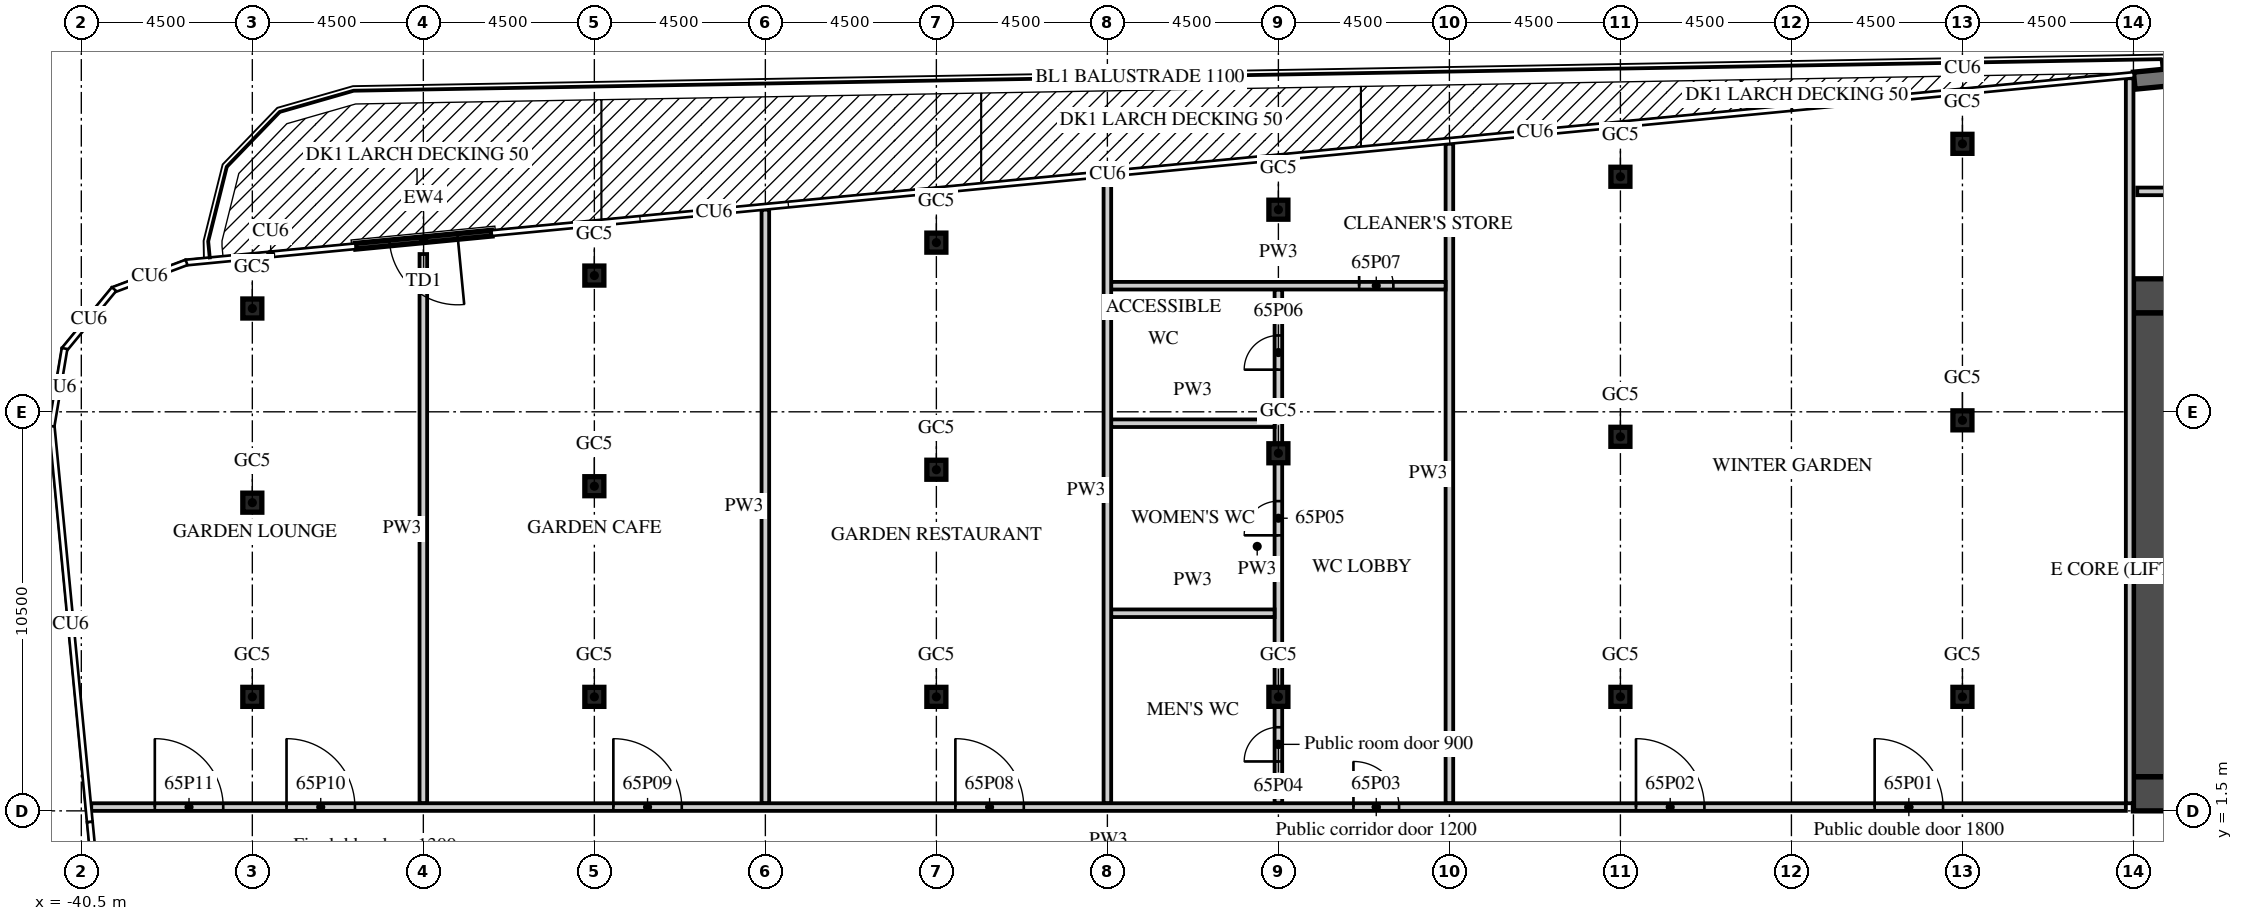
"""IFC4 building model, lengths in metres.
Left out: names, types, materials, properties, quantities, classifications, styles, units other than length and angle.
Written with IfcOpenShell. Run it as: python <this file> out.ifc"""

import sys

from ifc_helpers import new_model, si_unit, direction, frame, frame_2d, origin, origin_2d, place, context, subcontext, project, spatial, rectangle, extrude, element, fill, save


model = new_model("IFC4")
c1 = context("Model", 3, precision=1e-05, world=origin(), true_north=direction((0.0, 1.0)))
c2 = subcontext(c1, "Body", "Model", "MODEL_VIEW")
j1 = project(units=[si_unit("LENGTHUNIT", "METRE"), si_unit("PLANEANGLEUNIT", "RADIAN")], contexts=[c1])
p1 = place(None, origin())
s1 = spatial("IfcSite", under=j1, at=p1, CompositionType="ELEMENT")
p2 = place(p1, origin())
s2 = spatial("IfcBuilding", under=s1, at=p2, CompositionType="ELEMENT")
p3 = place(p2, frame((0.0, 0.0, 261.9)))
s3 = spatial("IfcBuildingStorey", under=s2, at=p3, CompositionType="ELEMENT", Elevation=261.9)
for number, where, z_axis, x_axis in (
    (1, (-36.0, 4.5, 0.0), (0.0, 0.0, 1.0), (1.0, 0.0, 0.0)),
    (2, (-36.0, 9.609, 0.0), (0.0, 0.0, 1.0), (1.0, 0.0, 0.0)),
    (3, (-36.0, 14.719, 0.0), (0.0, 0.0, 1.0), (1.0, 0.0, 0.0)),
    (4, (-27.0, 4.5, 0.0), (0.0, 0.0, 1.0), (1.0, 0.0, 0.0)),
    (5, (-27.0, 10.042, 0.0), (0.0, 0.0, 1.0), (1.0, 0.0, 0.0)),
    (6, (-27.0, 15.585, 0.0), (0.0, 0.0, 1.0), (1.0, 0.0, 0.0)),
    (7, (-18.0, 4.5, 0.0), (0.0, 0.0, 1.0), (1.0, 0.0, 0.0)),
    (8, (-18.0, 10.476, 0.0), (0.0, 0.0, 1.0), (1.0, 0.0, 0.0)),
    (9, (-18.0, 16.452, 0.0), (0.0, 0.0, 1.0), (1.0, 0.0, 0.0)),
    (10, (-9.0, 4.5, 0.0), (0.0, 0.0, 1.0), (1.0, 0.0, 0.0)),
    (11, (-9.0, 10.909, 0.0), (0.0, 0.0, 1.0), (1.0, 0.0, 0.0)),
    (12, (-9.0, 17.318, 0.0), (0.0, 0.0, 1.0), (1.0, 0.0, 0.0)),
    (13, (0.0, 4.5, 0.0), (0.0, 0.0, 1.0), (1.0, 0.0, 0.0)),
    (14, (0.0, 11.342, 0.0), (0.0, 0.0, 1.0), (1.0, 0.0, 0.0)),
    (15, (0.0, 18.185, 0.0), (0.0, 0.0, 1.0), (1.0, 0.0, 0.0)),
    (16, (9.0, 4.5, 0.0), (0.0, 0.0, 1.0), (1.0, 0.0, 0.0)),
    (17, (9.0, 11.776, 0.0), (0.0, 0.0, 1.0), (1.0, 0.0, 0.0)),
    (18, (9.0, 19.052, 0.0), (0.0, 0.0, 1.0), (1.0, 0.0, 0.0)),
):
    element("IfcColumn", number, at=place(p3, frame(where, z_axis=z_axis, x_axis=x_axis)), inside=s3, PredefinedType="COLUMN", context=c2, shape_type="SweptSolid", body=[
        extrude(rectangle(XDim=0.5, YDim=0.5, at=origin_2d()), origin(), (0.0, 0.0, 1.0), 5.32),
    ])
p4 = place(p3, frame((30.946, 22.391, 0.0), z_axis=(0.0, 0.0, 1.0), x_axis=(-0.995396397117, -0.095843688398, 0.0)))
e19 = element("IfcWall", 19, at=p4, inside=s3, PredefinedType="SOLIDWALL", context=c2, shape_type="SweptSolid", body=[
    extrude(rectangle(XDim=17.505, YDim=0.45, at=frame_2d((8.752, 0.0))), origin(), (0.0, 0.0, 1.0), 6.32),
])
p5 = place(p3, frame((-29.701, 16.702, 0.0), z_axis=(0.0, 0.0, 1.0), x_axis=(-0.995398337395, -0.095823535273, 0.0)))
e20 = element("IfcWall", 20, at=p5, inside=s3, PredefinedType="SOLIDWALL", context=c2, shape_type="SweptSolid", body=[
    extrude(rectangle(XDim=3.6, YDim=0.15, at=frame_2d((1.8, 0.0))), origin(), (0.0, 0.0, 1.0), 6.32),
])
p6 = place(p5, frame((0.9, 0.0, 0.0)))
e21 = element("IfcOpeningElement", 21, at=p6, cuts=e20, PredefinedType="OPENING", context=c2, shape_type="SweptSolid", body=[
    extrude(rectangle(XDim=1.8, YDim=2.4, at=frame_2d((0.9, 1.2))), frame((0.0, 0.085, 0.0), z_axis=(0.0, -1.0, 0.0), x_axis=(1.0, 0.0, 0.0)), (0.0, 0.0, 1.0), 0.17),
])
p7 = place(p3, frame((13.5, 1.95, 0.0), z_axis=(0.0, 0.0, 1.0), x_axis=(1.0, 0.0, 0.0)))
e22 = element("IfcWall", 22, at=p7, inside=s3, PredefinedType="SHEAR", context=c2, shape_type="SweptSolid", body=[
    extrude(rectangle(XDim=18.0, YDim=0.9, at=frame_2d((9.0, 0.0))), origin(), (0.0, 0.0, 1.0), 6.32),
])
p8 = place(p7, frame((1.475, 0.0, 0.0)))
e23 = element("IfcOpeningElement", 23, at=p8, cuts=e22, PredefinedType="OPENING", context=c2, shape_type="SweptSolid", body=[
    extrude(rectangle(XDim=1.8, YDim=2.1, at=frame_2d((0.9, 1.05))), frame((0.0, 0.46, 0.0), z_axis=(0.0, -1.0, 0.0), x_axis=(1.0, 0.0, 0.0)), (0.0, 0.0, 1.0), 0.92),
])
p9 = place(p3, frame((13.5, 15.05, 0.0), z_axis=(0.0, 0.0, 1.0), x_axis=(1.0, 0.0, 0.0)))
e24 = element("IfcWall", 24, at=p9, inside=s3, PredefinedType="SHEAR", context=c2, shape_type="SweptSolid", body=[
    extrude(rectangle(XDim=6.8, YDim=0.9, at=frame_2d((3.4, 0.0))), origin(), (0.0, 0.0, 1.0), 6.32),
])
p10 = place(p9, frame((4.725, 0.0, 0.0)))
e25 = element("IfcOpeningElement", 25, at=p10, cuts=e24, PredefinedType="OPENING", context=c2, shape_type="SweptSolid", body=[
    extrude(rectangle(XDim=1.2, YDim=2.1, at=frame_2d((0.6, 1.05))), frame((0.0, 0.46, 0.0), z_axis=(0.0, -1.0, 0.0), x_axis=(1.0, 0.0, 0.0)), (0.0, 0.0, 1.0), 0.92),
])
p11 = place(p3, frame((13.95, 2.4, 0.0), z_axis=(0.0, 0.0, 1.0), x_axis=(0.0, 1.0, 0.0)))
e26 = element("IfcWall", 26, at=p11, inside=s3, PredefinedType="SHEAR", context=c2, shape_type="SweptSolid", body=[
    extrude(rectangle(XDim=12.2, YDim=0.9, at=frame_2d((6.1, 0.0))), origin(), (0.0, 0.0, 1.0), 6.32),
])
p12 = place(p3, frame((13.6, 17.8, 0.0), z_axis=(0.0, 0.0, 1.0), x_axis=(1.0, 0.0, 0.0)))
e27 = element("IfcWall", 27, at=p12, inside=s3, PredefinedType="PARTITIONING", context=c2, shape_type="SweptSolid", body=[
    extrude(rectangle(XDim=21.656, YDim=0.2, at=frame_2d((10.828, 0.0))), origin(), (0.0, 0.0, 1.0), 6.32),
])
p13 = place(p12, frame((17.812, 0.0, 0.0)))
e28 = element("IfcOpeningElement", 28, at=p13, cuts=e27, PredefinedType="OPENING", context=c2, shape_type="SweptSolid", body=[
    extrude(rectangle(XDim=0.9, YDim=2.1, at=frame_2d((0.45, 1.05))), frame((0.0, 0.11, 0.0), z_axis=(0.0, -1.0, 0.0), x_axis=(1.0, 0.0, 0.0)), (0.0, 0.0, 1.0), 0.22),
])
p14 = place(p12, frame((9.512, 0.0, 0.0)))
e29 = element("IfcOpeningElement", 29, at=p14, cuts=e27, PredefinedType="OPENING", context=c2, shape_type="SweptSolid", body=[
    extrude(rectangle(XDim=0.9, YDim=2.1, at=frame_2d((0.45, 1.05))), frame((0.0, 0.11, 0.0), z_axis=(0.0, -1.0, 0.0), x_axis=(1.0, 0.0, 0.0)), (0.0, 0.0, 1.0), 0.22),
])
p15 = place(p3, frame((-4.5, 1.7, 0.0), z_axis=(0.0, 0.0, 1.0), x_axis=(0.0, 1.0, 0.0)))
e30 = element("IfcWall", 30, at=p15, inside=s3, PredefinedType="PARTITIONING", context=c2, shape_type="SweptSolid", body=[
    extrude(rectangle(XDim=17.353, YDim=0.2, at=frame_2d((8.677, 0.0))), origin(), (0.0, 0.0, 1.0), 6.32),
])
p16 = place(p3, frame((-9.0, 1.7, 0.0), z_axis=(0.0, 0.0, 1.0), x_axis=(0.0, 1.0, 0.0)))
e31 = element("IfcWall", 31, at=p16, inside=s3, PredefinedType="PARTITIONING", context=c2, shape_type="SweptSolid", body=[
    extrude(rectangle(XDim=13.518, YDim=0.2, at=frame_2d((6.759, 0.0))), origin(), (0.0, 0.0, 1.0), 5.32),
])
p17 = place(p16, frame((1.1, 0.0, 0.0)))
e32 = element("IfcOpeningElement", 32, at=p17, cuts=e31, PredefinedType="OPENING", context=c2, shape_type="SweptSolid", body=[
    extrude(rectangle(XDim=0.9, YDim=2.1, at=frame_2d((0.45, 1.05))), frame((0.0, 0.11, 0.0), z_axis=(0.0, -1.0, 0.0), x_axis=(1.0, 0.0, 0.0)), (0.0, 0.0, 1.0), 0.22),
])
p18 = place(p16, frame((7.05, 0.0, 0.0)))
e33 = element("IfcOpeningElement", 33, at=p18, cuts=e31, PredefinedType="OPENING", context=c2, shape_type="SweptSolid", body=[
    extrude(rectangle(XDim=0.9, YDim=2.1, at=frame_2d((0.45, 1.05))), frame((0.0, 0.11, 0.0), z_axis=(0.0, -1.0, 0.0), x_axis=(1.0, 0.0, 0.0)), (0.0, 0.0, 1.0), 0.22),
])
p19 = place(p16, frame((11.409, 0.0, 0.0)))
e34 = element("IfcOpeningElement", 34, at=p19, cuts=e31, PredefinedType="OPENING", context=c2, shape_type="SweptSolid", body=[
    extrude(rectangle(XDim=0.9, YDim=2.1, at=frame_2d((0.45, 1.05))), frame((0.0, 0.11, 0.0), z_axis=(0.0, -1.0, 0.0), x_axis=(1.0, 0.0, 0.0)), (0.0, 0.0, 1.0), 0.22),
])
for number, where, z_axis, x_axis in (
    (35, (-13.4, 6.7, 0.0), (0.0, 0.0, 1.0), (1.0, 0.0, 0.0)),
    (36, (-13.4, 11.7, 0.0), (0.0, 0.0, 1.0), (1.0, 0.0, 0.0)),
):
    element("IfcWall", number, at=place(p3, frame(where, z_axis=z_axis, x_axis=x_axis)), inside=s3, PredefinedType="PARTITIONING", context=c2, shape_type="SweptSolid", body=[
        extrude(rectangle(XDim=4.3, YDim=0.2, at=frame_2d((2.15, 0.0))), origin(), (0.0, 0.0, 1.0), 5.32),
    ])
p20 = place(p3, frame((-13.4, 15.318, 0.0), z_axis=(0.0, 0.0, 1.0), x_axis=(1.0, 0.0, 0.0)))
e37 = element("IfcWall", 37, at=p20, inside=s3, PredefinedType="PARTITIONING", context=c2, shape_type="SweptSolid", body=[
    extrude(rectangle(XDim=8.8, YDim=0.2, at=frame_2d((4.4, 0.0))), origin(), (0.0, 0.0, 1.0), 5.32),
])
p21 = place(p20, frame((6.525, 0.0, 0.0)))
e38 = element("IfcOpeningElement", 38, at=p21, cuts=e37, PredefinedType="OPENING", context=c2, shape_type="SweptSolid", body=[
    extrude(rectangle(XDim=0.9, YDim=2.1, at=frame_2d((0.45, 1.05))), frame((0.0, 0.11, 0.0), z_axis=(0.0, -1.0, 0.0), x_axis=(1.0, 0.0, 0.0)), (0.0, 0.0, 1.0), 0.22),
])
p22 = place(p3, frame((-13.5, 1.7, 0.0), z_axis=(0.0, 0.0, 1.0), x_axis=(0.0, 1.0, 0.0)))
e39 = element("IfcWall", 39, at=p22, inside=s3, PredefinedType="PARTITIONING", context=c2, shape_type="SweptSolid", body=[
    extrude(rectangle(XDim=16.486, YDim=0.2, at=frame_2d((8.243, 0.0))), origin(), (0.0, 0.0, 1.0), 6.32),
])
p23 = place(p3, frame((-22.5, 1.7, 0.0), z_axis=(0.0, 0.0, 1.0), x_axis=(0.0, 1.0, 0.0)))
e40 = element("IfcWall", 40, at=p23, inside=s3, PredefinedType="PARTITIONING", context=c2, shape_type="SweptSolid", body=[
    extrude(rectangle(XDim=15.62, YDim=0.2, at=frame_2d((7.81, 0.0))), origin(), (0.0, 0.0, 1.0), 6.32),
])
p24 = place(p3, frame((-31.5, 1.7, 0.0), z_axis=(0.0, 0.0, 1.0), x_axis=(0.0, 1.0, 0.0)))
e41 = element("IfcWall", 41, at=p24, inside=s3, PredefinedType="PARTITIONING", context=c2, shape_type="SweptSolid", body=[
    extrude(rectangle(XDim=14.452, YDim=0.2, at=frame_2d((7.226, 0.0))), origin(), (0.0, 0.0, 1.0), 6.32),
])
p25 = place(p3, frame((-40.239, 1.6, 0.0), z_axis=(0.0, 0.0, 1.0), x_axis=(1.0, 0.0, 0.0)))
e42 = element("IfcWall", 42, at=p25, inside=s3, PredefinedType="PARTITIONING", context=c2, shape_type="SweptSolid", body=[
    extrude(rectangle(XDim=53.539, YDim=0.2, at=frame_2d((26.77, 0.0))), origin(), (0.0, 0.0, 1.0), 5.32),
])
p26 = place(p25, frame((46.929, 0.0, 0.0)))
e43 = element("IfcOpeningElement", 43, at=p26, cuts=e42, PredefinedType="OPENING", context=c2, shape_type="SweptSolid", body=[
    extrude(rectangle(XDim=1.8, YDim=2.1, at=frame_2d((0.9, 1.05))), frame((0.0, 0.11, 0.0), z_axis=(0.0, -1.0, 0.0), x_axis=(1.0, 0.0, 0.0)), (0.0, 0.0, 1.0), 0.22),
])
p27 = place(p25, frame((40.649, 0.0, 0.0)))
e44 = element("IfcOpeningElement", 44, at=p27, cuts=e42, PredefinedType="OPENING", context=c2, shape_type="SweptSolid", body=[
    extrude(rectangle(XDim=1.8, YDim=2.1, at=frame_2d((0.9, 1.05))), frame((0.0, 0.11, 0.0), z_axis=(0.0, -1.0, 0.0), x_axis=(1.0, 0.0, 0.0)), (0.0, 0.0, 1.0), 0.22),
])
p28 = place(p25, frame((33.214, 0.0, 0.0)))
e45 = element("IfcOpeningElement", 45, at=p28, cuts=e42, PredefinedType="OPENING", context=c2, shape_type="SweptSolid", body=[
    extrude(rectangle(XDim=1.2, YDim=2.1, at=frame_2d((0.6, 1.05))), frame((0.0, 0.11, 0.0), z_axis=(0.0, -1.0, 0.0), x_axis=(1.0, 0.0, 0.0)), (0.0, 0.0, 1.0), 0.22),
])
p29 = place(p25, frame((22.739, 0.0, 0.0)))
e46 = element("IfcOpeningElement", 46, at=p29, cuts=e42, PredefinedType="OPENING", context=c2, shape_type="SweptSolid", body=[
    extrude(rectangle(XDim=1.8, YDim=2.1, at=frame_2d((0.9, 1.05))), frame((0.0, 0.11, 0.0), z_axis=(0.0, -1.0, 0.0), x_axis=(1.0, 0.0, 0.0)), (0.0, 0.0, 1.0), 0.22),
])
p30 = place(p25, frame((13.739, 0.0, 0.0)))
e47 = element("IfcOpeningElement", 47, at=p30, cuts=e42, PredefinedType="OPENING", context=c2, shape_type="SweptSolid", body=[
    extrude(rectangle(XDim=1.8, YDim=2.1, at=frame_2d((0.9, 1.05))), frame((0.0, 0.11, 0.0), z_axis=(0.0, -1.0, 0.0), x_axis=(1.0, 0.0, 0.0)), (0.0, 0.0, 1.0), 0.22),
])
p31 = place(p25, frame((5.139, 0.0, 0.0)))
e48 = element("IfcOpeningElement", 48, at=p31, cuts=e42, PredefinedType="OPENING", context=c2, shape_type="SweptSolid", body=[
    extrude(rectangle(XDim=1.8, YDim=2.1, at=frame_2d((0.9, 1.05))), frame((0.0, 0.11, 0.0), z_axis=(0.0, -1.0, 0.0), x_axis=(1.0, 0.0, 0.0)), (0.0, 0.0, 1.0), 0.22),
])
p32 = place(p25, frame((1.673, 0.0, 0.0)))
e49 = element("IfcOpeningElement", 49, at=p32, cuts=e42, PredefinedType="OPENING", context=c2, shape_type="SweptSolid", body=[
    extrude(rectangle(XDim=1.8, YDim=2.1, at=frame_2d((0.9, 1.05))), frame((0.0, 0.11, 0.0), z_axis=(0.0, -1.0, 0.0), x_axis=(1.0, 0.0, 0.0)), (0.0, 0.0, 1.0), 0.22),
])
p33 = place(p3, frame((13.4, 1.7, 0.0), z_axis=(0.0, 0.0, 1.0), x_axis=(0.0, 1.0, 0.0)))
e50 = element("IfcWall", 50, at=p33, inside=s3, PredefinedType="PARTITIONING", context=c2, shape_type="SweptSolid", body=[
    extrude(rectangle(XDim=19.077, YDim=0.2, at=frame_2d((9.538, 0.0))), origin(), (0.0, 0.0, 1.0), 6.32),
])
p34 = place(p6, origin())
e51 = element("IfcDoor", 51, at=p34, inside=s3, OperationType="SINGLE_SWING_LEFT", PredefinedType="DOOR", context=c2, shape_type="SweptSolid", body=[
    extrude(rectangle(XDim=1.8, YDim=2.4, at=frame_2d((0.9, 1.2))), frame((0.0, 0.025, 0.0), z_axis=(0.0, -1.0, 0.0), x_axis=(1.0, 0.0, 0.0)), (0.0, 0.0, 1.0), 0.05),
])
fill(e21, e51)
p35 = place(p26, origin())
e52 = element("IfcDoor", 52, at=p35, inside=s3, OperationType="DOUBLE_DOOR_DOUBLE_SWING", PredefinedType="DOOR", context=c2, shape_type="SweptSolid", body=[
    extrude(rectangle(XDim=1.8, YDim=2.1, at=frame_2d((0.9, 1.05))), frame((0.0, 0.025, 0.0), z_axis=(0.0, -1.0, 0.0), x_axis=(1.0, 0.0, 0.0)), (0.0, 0.0, 1.0), 0.05),
])
fill(e43, e52)
p36 = place(p27, origin())
e53 = element("IfcDoor", 53, at=p36, inside=s3, OperationType="DOUBLE_DOOR_DOUBLE_SWING", PredefinedType="DOOR", context=c2, shape_type="SweptSolid", body=[
    extrude(rectangle(XDim=1.8, YDim=2.1, at=frame_2d((0.9, 1.05))), frame((0.0, 0.025, 0.0), z_axis=(0.0, -1.0, 0.0), x_axis=(1.0, 0.0, 0.0)), (0.0, 0.0, 1.0), 0.05),
])
fill(e44, e53)
p37 = place(p28, origin())
e54 = element("IfcDoor", 54, at=p37, inside=s3, OperationType="SINGLE_SWING_LEFT", PredefinedType="DOOR", context=c2, shape_type="SweptSolid", body=[
    extrude(rectangle(XDim=1.2, YDim=2.1, at=frame_2d((0.6, 1.05))), frame((0.0, 0.025, 0.0), z_axis=(0.0, -1.0, 0.0), x_axis=(1.0, 0.0, 0.0)), (0.0, 0.0, 1.0), 0.05),
])
fill(e45, e54)
p38 = place(p17, origin())
e55 = element("IfcDoor", 55, at=p38, inside=s3, OperationType="SINGLE_SWING_LEFT", PredefinedType="DOOR", context=c2, shape_type="SweptSolid", body=[
    extrude(rectangle(XDim=0.9, YDim=2.1, at=frame_2d((0.45, 1.05))), frame((0.0, 0.025, 0.0), z_axis=(0.0, -1.0, 0.0), x_axis=(1.0, 0.0, 0.0)), (0.0, 0.0, 1.0), 0.05),
])
fill(e32, e55)
p39 = place(p18, origin())
e56 = element("IfcDoor", 56, at=p39, inside=s3, OperationType="SINGLE_SWING_LEFT", PredefinedType="DOOR", context=c2, shape_type="SweptSolid", body=[
    extrude(rectangle(XDim=0.9, YDim=2.1, at=frame_2d((0.45, 1.05))), frame((0.0, 0.025, 0.0), z_axis=(0.0, -1.0, 0.0), x_axis=(1.0, 0.0, 0.0)), (0.0, 0.0, 1.0), 0.05),
])
fill(e33, e56)
p40 = place(p19, origin())
e57 = element("IfcDoor", 57, at=p40, inside=s3, OperationType="SINGLE_SWING_LEFT", PredefinedType="DOOR", context=c2, shape_type="SweptSolid", body=[
    extrude(rectangle(XDim=0.9, YDim=2.1, at=frame_2d((0.45, 1.05))), frame((0.0, 0.025, 0.0), z_axis=(0.0, -1.0, 0.0), x_axis=(1.0, 0.0, 0.0)), (0.0, 0.0, 1.0), 0.05),
])
fill(e34, e57)
p41 = place(p21, origin())
e58 = element("IfcDoor", 58, at=p41, inside=s3, OperationType="SINGLE_SWING_LEFT", PredefinedType="DOOR", context=c2, shape_type="SweptSolid", body=[
    extrude(rectangle(XDim=0.9, YDim=2.1, at=frame_2d((0.45, 1.05))), frame((0.0, 0.025, 0.0), z_axis=(0.0, -1.0, 0.0), x_axis=(1.0, 0.0, 0.0)), (0.0, 0.0, 1.0), 0.05),
])
fill(e38, e58)
p42 = place(p29, origin())
e59 = element("IfcDoor", 59, at=p42, inside=s3, OperationType="DOUBLE_DOOR_DOUBLE_SWING", PredefinedType="DOOR", context=c2, shape_type="SweptSolid", body=[
    extrude(rectangle(XDim=1.8, YDim=2.1, at=frame_2d((0.9, 1.05))), frame((0.0, 0.025, 0.0), z_axis=(0.0, -1.0, 0.0), x_axis=(1.0, 0.0, 0.0)), (0.0, 0.0, 1.0), 0.05),
])
fill(e46, e59)
p43 = place(p30, origin())
e60 = element("IfcDoor", 60, at=p43, inside=s3, OperationType="DOUBLE_DOOR_DOUBLE_SWING", PredefinedType="DOOR", context=c2, shape_type="SweptSolid", body=[
    extrude(rectangle(XDim=1.8, YDim=2.1, at=frame_2d((0.9, 1.05))), frame((0.0, 0.025, 0.0), z_axis=(0.0, -1.0, 0.0), x_axis=(1.0, 0.0, 0.0)), (0.0, 0.0, 1.0), 0.05),
])
fill(e47, e60)
p44 = place(p31, origin())
e61 = element("IfcDoor", 61, at=p44, inside=s3, OperationType="DOUBLE_DOOR_DOUBLE_SWING", PredefinedType="DOOR", context=c2, shape_type="SweptSolid", body=[
    extrude(rectangle(XDim=1.8, YDim=2.1, at=frame_2d((0.9, 1.05))), frame((0.0, 0.025, 0.0), z_axis=(0.0, -1.0, 0.0), x_axis=(1.0, 0.0, 0.0)), (0.0, 0.0, 1.0), 0.05),
])
fill(e48, e61)
p45 = place(p32, origin())
e62 = element("IfcDoor", 62, at=p45, inside=s3, OperationType="DOUBLE_DOOR_DOUBLE_SWING", PredefinedType="DOOR", context=c2, shape_type="SweptSolid", body=[
    extrude(rectangle(XDim=1.8, YDim=2.1, at=frame_2d((0.9, 1.05))), frame((0.0, 0.025, 0.0), z_axis=(0.0, -1.0, 0.0), x_axis=(1.0, 0.0, 0.0)), (0.0, 0.0, 1.0), 0.05),
])
fill(e49, e62)
save(model, sys.argv[1])
